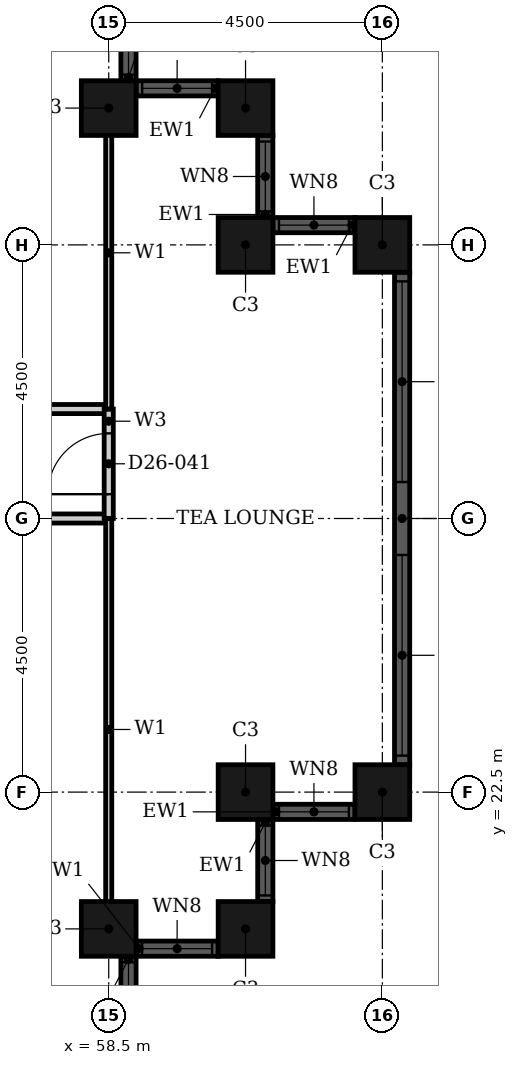
"""IFC4 building model, lengths in metres.
Left out: names, types, materials, properties, quantities, classifications, styles, units other than length and angle.
Written with IfcOpenShell. Run it as: python <this file> out.ifc"""

import sys

from ifc_helpers import new_model, si_unit, direction, frame, frame_2d, origin, origin_2d, place, context, subcontext, project, spatial, rectangle, hollow_rectangle, extrude, element, fill, save


model = new_model("IFC4")
c1 = context("Model", 3, precision=1e-05, world=origin(), true_north=direction((0.0, 1.0)))
c2 = subcontext(c1, "Body", "Model", "MODEL_VIEW")
j1 = project(units=[si_unit("LENGTHUNIT", "METRE"), si_unit("PLANEANGLEUNIT", "RADIAN")], contexts=[c1])
p1 = place(None, origin())
s1 = spatial("IfcSite", under=j1, at=p1, CompositionType="ELEMENT")
p2 = place(p1, origin())
s2 = spatial("IfcBuilding", under=s1, at=p2, CompositionType="ELEMENT")
p3 = place(p2, frame((0.0, 0.0, 108.0)))
s3 = spatial("IfcBuildingStorey", under=s2, at=p3, CompositionType="ELEMENT", Elevation=108.0)
for number, where, z_axis, x_axis in (
    (1, (58.5, 20.25, 0.0), (0.0, 0.0, 1.0), (1.0, 0.0, 0.0)),
    (2, (60.75, 20.25, 0.0), (0.0, 0.0, 1.0), (1.0, 0.0, 0.0)),
    (3, (60.75, 22.5, 0.0), (0.0, 0.0, 1.0), (1.0, 0.0, 0.0)),
    (4, (63.0, 22.5, 0.0), (0.0, 0.0, 1.0), (1.0, 0.0, 0.0)),
    (5, (63.0, 31.5, 0.0), (0.0, 0.0, 1.0), (1.0, 0.0, 0.0)),
    (6, (60.75, 31.5, 0.0), (0.0, 0.0, 1.0), (1.0, 0.0, 0.0)),
    (7, (60.75, 33.75, 0.0), (0.0, 0.0, 1.0), (1.0, 0.0, 0.0)),
    (8, (58.5, 33.75, 0.0), (0.0, 0.0, 1.0), (1.0, 0.0, 0.0)),
):
    element("IfcColumn", number, at=place(p3, frame(where, z_axis=z_axis, x_axis=x_axis)), inside=s3, PredefinedType="COLUMN", context=c2, shape_type="SweptSolid", body=[
        extrude(hollow_rectangle(XDim=0.9, YDim=0.9, WallThickness=0.028, at=origin_2d()), origin(), (0.0, 0.0, 1.0), 3.6),
    ])
p4 = place(p3, frame((58.825, 18.45, 0.0), z_axis=(0.0, 0.0, 1.0), x_axis=(0.0, 1.0, 0.0)))
e9 = element("IfcWall", 9, at=p4, inside=s3, PredefinedType="SOLIDWALL", context=c2, shape_type="SweptSolid", body=[
    extrude(rectangle(XDim=1.35, YDim=0.25, at=frame_2d((0.675, 0.0))), origin(), (0.0, 0.0, 1.0), 3.6),
])
p5 = place(p4, frame((0.1, 0.0, 0.9)))
e10 = element("IfcOpeningElement", 10, at=p5, cuts=e9, PredefinedType="OPENING", context=c2, shape_type="SweptSolid", body=[
    extrude(rectangle(XDim=1.15, YDim=2.08, at=frame_2d((0.575, 1.04))), frame((0.0, 0.135, 0.0), z_axis=(0.0, -1.0, 0.0), x_axis=(1.0, 0.0, 0.0)), (0.0, 0.0, 1.0), 0.27),
])
p6 = place(p3, frame((58.95, 19.925, 0.0), z_axis=(0.0, 0.0, 1.0), x_axis=(1.0, 0.0, 0.0)))
e11 = element("IfcWall", 11, at=p6, inside=s3, PredefinedType="SOLIDWALL", context=c2, shape_type="SweptSolid", body=[
    extrude(rectangle(XDim=1.35, YDim=0.25, at=frame_2d((0.675, 0.0))), origin(), (0.0, 0.0, 1.0), 3.6),
])
p7 = place(p6, frame((0.1, 0.0, 0.9)))
e12 = element("IfcOpeningElement", 12, at=p7, cuts=e11, PredefinedType="OPENING", context=c2, shape_type="SweptSolid", body=[
    extrude(rectangle(XDim=1.15, YDim=2.08, at=frame_2d((0.575, 1.04))), frame((0.0, 0.135, 0.0), z_axis=(0.0, -1.0, 0.0), x_axis=(1.0, 0.0, 0.0)), (0.0, 0.0, 1.0), 0.27),
])
p8 = place(p3, frame((61.075, 20.7, 0.0), z_axis=(0.0, 0.0, 1.0), x_axis=(0.0, 1.0, 0.0)))
e13 = element("IfcWall", 13, at=p8, inside=s3, PredefinedType="SOLIDWALL", context=c2, shape_type="SweptSolid", body=[
    extrude(rectangle(XDim=1.35, YDim=0.25, at=frame_2d((0.675, 0.0))), origin(), (0.0, 0.0, 1.0), 3.6),
])
p9 = place(p8, frame((0.1, 0.0, 0.9)))
e14 = element("IfcOpeningElement", 14, at=p9, cuts=e13, PredefinedType="OPENING", context=c2, shape_type="SweptSolid", body=[
    extrude(rectangle(XDim=1.15, YDim=2.08, at=frame_2d((0.575, 1.04))), frame((0.0, 0.135, 0.0), z_axis=(0.0, -1.0, 0.0), x_axis=(1.0, 0.0, 0.0)), (0.0, 0.0, 1.0), 0.27),
])
p10 = place(p3, frame((61.2, 22.175, 0.0), z_axis=(0.0, 0.0, 1.0), x_axis=(1.0, 0.0, 0.0)))
e15 = element("IfcWall", 15, at=p10, inside=s3, PredefinedType="SOLIDWALL", context=c2, shape_type="SweptSolid", body=[
    extrude(rectangle(XDim=1.35, YDim=0.25, at=frame_2d((0.675, 0.0))), origin(), (0.0, 0.0, 1.0), 3.6),
])
p11 = place(p10, frame((0.1, 0.0, 0.9)))
e16 = element("IfcOpeningElement", 16, at=p11, cuts=e15, PredefinedType="OPENING", context=c2, shape_type="SweptSolid", body=[
    extrude(rectangle(XDim=1.15, YDim=2.08, at=frame_2d((0.575, 1.04))), frame((0.0, 0.135, 0.0), z_axis=(0.0, -1.0, 0.0), x_axis=(1.0, 0.0, 0.0)), (0.0, 0.0, 1.0), 0.27),
])
p12 = place(p3, frame((63.325, 22.95, 0.0), z_axis=(0.0, 0.0, 1.0), x_axis=(0.0, 1.0, 0.0)))
e17 = element("IfcWall", 17, at=p12, inside=s3, PredefinedType="SOLIDWALL", context=c2, shape_type="SweptSolid", body=[
    extrude(rectangle(XDim=8.1, YDim=0.25, at=frame_2d((4.05, 0.0))), origin(), (0.0, 0.0, 1.0), 3.6),
])
p13 = place(p12, frame((0.15, 0.0, 0.9)))
e18 = element("IfcOpeningElement", 18, at=p13, cuts=e17, PredefinedType="OPENING", context=c2, shape_type="SweptSolid", body=[
    extrude(rectangle(XDim=3.3, YDim=2.08, at=frame_2d((1.65, 1.04))), frame((0.0, 0.135, 0.0), z_axis=(0.0, -1.0, 0.0), x_axis=(1.0, 0.0, 0.0)), (0.0, 0.0, 1.0), 0.27),
])
p14 = place(p12, frame((4.65, 0.0, 0.9)))
e19 = element("IfcOpeningElement", 19, at=p14, cuts=e17, PredefinedType="OPENING", context=c2, shape_type="SweptSolid", body=[
    extrude(rectangle(XDim=3.3, YDim=2.08, at=frame_2d((1.65, 1.04))), frame((0.0, 0.135, 0.0), z_axis=(0.0, -1.0, 0.0), x_axis=(1.0, 0.0, 0.0)), (0.0, 0.0, 1.0), 0.27),
])
p15 = place(p3, frame((62.55, 31.825, 0.0), z_axis=(0.0, 0.0, 1.0), x_axis=(-1.0, 0.0, 0.0)))
e20 = element("IfcWall", 20, at=p15, inside=s3, PredefinedType="SOLIDWALL", context=c2, shape_type="SweptSolid", body=[
    extrude(rectangle(XDim=1.35, YDim=0.25, at=frame_2d((0.675, 0.0))), origin(), (0.0, 0.0, 1.0), 3.6),
])
p16 = place(p15, frame((0.1, 0.0, 0.9)))
e21 = element("IfcOpeningElement", 21, at=p16, cuts=e20, PredefinedType="OPENING", context=c2, shape_type="SweptSolid", body=[
    extrude(rectangle(XDim=1.15, YDim=2.08, at=frame_2d((0.575, 1.04))), frame((0.0, 0.135, 0.0), z_axis=(0.0, -1.0, 0.0), x_axis=(1.0, 0.0, 0.0)), (0.0, 0.0, 1.0), 0.27),
])
p17 = place(p3, frame((61.075, 31.95, 0.0), z_axis=(0.0, 0.0, 1.0), x_axis=(0.0, 1.0, 0.0)))
e22 = element("IfcWall", 22, at=p17, inside=s3, PredefinedType="SOLIDWALL", context=c2, shape_type="SweptSolid", body=[
    extrude(rectangle(XDim=1.35, YDim=0.25, at=frame_2d((0.675, 0.0))), origin(), (0.0, 0.0, 1.0), 3.6),
])
p18 = place(p17, frame((0.1, 0.0, 0.9)))
e23 = element("IfcOpeningElement", 23, at=p18, cuts=e22, PredefinedType="OPENING", context=c2, shape_type="SweptSolid", body=[
    extrude(rectangle(XDim=1.15, YDim=2.08, at=frame_2d((0.575, 1.04))), frame((0.0, 0.135, 0.0), z_axis=(0.0, -1.0, 0.0), x_axis=(1.0, 0.0, 0.0)), (0.0, 0.0, 1.0), 0.27),
])
p19 = place(p3, frame((60.3, 34.075, 0.0), z_axis=(0.0, 0.0, 1.0), x_axis=(-1.0, 0.0, 0.0)))
e24 = element("IfcWall", 24, at=p19, inside=s3, PredefinedType="SOLIDWALL", context=c2, shape_type="SweptSolid", body=[
    extrude(rectangle(XDim=1.35, YDim=0.25, at=frame_2d((0.675, 0.0))), origin(), (0.0, 0.0, 1.0), 3.6),
])
p20 = place(p19, frame((0.1, 0.0, 0.9)))
e25 = element("IfcOpeningElement", 25, at=p20, cuts=e24, PredefinedType="OPENING", context=c2, shape_type="SweptSolid", body=[
    extrude(rectangle(XDim=1.15, YDim=2.08, at=frame_2d((0.575, 1.04))), frame((0.0, 0.135, 0.0), z_axis=(0.0, -1.0, 0.0), x_axis=(1.0, 0.0, 0.0)), (0.0, 0.0, 1.0), 0.27),
])
p21 = place(p3, frame((58.825, 34.2, 0.0), z_axis=(0.0, 0.0, 1.0), x_axis=(0.0, 1.0, 0.0)))
e26 = element("IfcWall", 26, at=p21, inside=s3, PredefinedType="SOLIDWALL", context=c2, shape_type="SweptSolid", body=[
    extrude(rectangle(XDim=1.35, YDim=0.25, at=frame_2d((0.675, 0.0))), origin(), (0.0, 0.0, 1.0), 3.6),
])
p22 = place(p21, frame((0.1, 0.0, 0.9)))
e27 = element("IfcOpeningElement", 27, at=p22, cuts=e26, PredefinedType="OPENING", context=c2, shape_type="SweptSolid", body=[
    extrude(rectangle(XDim=1.15, YDim=2.08, at=frame_2d((0.575, 1.04))), frame((0.0, 0.135, 0.0), z_axis=(0.0, -1.0, 0.0), x_axis=(1.0, 0.0, 0.0)), (0.0, 0.0, 1.0), 0.27),
])
p23 = place(p3, frame((46.8, 27.0, 0.0), z_axis=(0.0, 0.0, 1.0), x_axis=(1.0, 0.0, 0.0)))
e28 = element("IfcWall", 28, at=p23, inside=s3, PredefinedType="PARTITIONING", context=c2, shape_type="SweptSolid", body=[
    extrude(rectangle(XDim=11.7, YDim=0.15, at=frame_2d((5.85, 0.0))), origin(), (0.0, 0.0, 1.0), 2.58),
])
p24 = place(p23, frame((4.45, 0.0, 0.0)))
e29 = element("IfcOpeningElement", 29, at=p24, cuts=e28, PredefinedType="OPENING", context=c2, shape_type="SweptSolid", body=[
    extrude(rectangle(XDim=1.0, YDim=2.1, at=frame_2d((0.5, 1.05))), frame((0.0, 0.085, 0.0), z_axis=(0.0, -1.0, 0.0), x_axis=(1.0, 0.0, 0.0)), (0.0, 0.0, 1.0), 0.17),
])
p25 = place(p3, frame((46.8, 28.8, 0.0), z_axis=(0.0, 0.0, 1.0), x_axis=(1.0, 0.0, 0.0)))
e30 = element("IfcWall", 30, at=p25, inside=s3, PredefinedType="PARTITIONING", context=c2, shape_type="SweptSolid", body=[
    extrude(rectangle(XDim=11.7, YDim=0.15, at=frame_2d((5.85, 0.0))), origin(), (0.0, 0.0, 1.0), 3.3),
])
p26 = place(p25, frame((4.45, 0.0, 0.0)))
e31 = element("IfcOpeningElement", 31, at=p26, cuts=e30, PredefinedType="OPENING", context=c2, shape_type="SweptSolid", body=[
    extrude(rectangle(XDim=1.0, YDim=2.1, at=frame_2d((0.5, 1.05))), frame((0.0, 0.085, 0.0), z_axis=(0.0, -1.0, 0.0), x_axis=(1.0, 0.0, 0.0)), (0.0, 0.0, 1.0), 0.17),
])
p27 = place(p3, frame((58.5, 27.0, 0.0), z_axis=(0.0, 0.0, 1.0), x_axis=(0.0, 1.0, 0.0)))
e32 = element("IfcWall", 32, at=p27, inside=s3, PredefinedType="PARTITIONING", context=c2, shape_type="SweptSolid", body=[
    extrude(rectangle(XDim=1.8, YDim=0.15, at=frame_2d((0.9, 0.0))), origin(), (0.0, 0.0, 1.0), 3.3),
])
p28 = place(p27, frame((0.4, 0.0, 0.0)))
e33 = element("IfcOpeningElement", 33, at=p28, cuts=e32, PredefinedType="OPENING", context=c2, shape_type="SweptSolid", body=[
    extrude(rectangle(XDim=1.0, YDim=2.1, at=frame_2d((0.5, 1.05))), frame((0.0, 0.085, 0.0), z_axis=(0.0, -1.0, 0.0), x_axis=(1.0, 0.0, 0.0)), (0.0, 0.0, 1.0), 0.17),
])
p29 = place(p3, frame((58.5, 28.8, 0.0), z_axis=(0.0, 0.0, 1.0), x_axis=(0.0, 1.0, 0.0)))
e34 = element("IfcWall", 34, at=p29, inside=s3, PredefinedType="PARTITIONING", context=c2, shape_type="SweptSolid", body=[
    extrude(rectangle(XDim=5.14, YDim=0.1, at=frame_2d((2.57, 0.0))), origin(), (0.0, 0.0, 1.0), 3.3),
])
p30 = place(p3, frame((58.5, 20.06, 0.0), z_axis=(0.0, 0.0, 1.0), x_axis=(0.0, 1.0, 0.0)))
e35 = element("IfcWall", 35, at=p30, inside=s3, PredefinedType="PARTITIONING", context=c2, shape_type="SweptSolid", body=[
    extrude(rectangle(XDim=6.94, YDim=0.1, at=frame_2d((3.47, 0.0))), origin(), (0.0, 0.0, 1.0), 3.3),
])
p31 = place(p5, origin())
e36 = element("IfcWindow", 36, at=p31, inside=s3, PartitioningType="SINGLE_PANEL", PredefinedType="WINDOW", context=c2, shape_type="SweptSolid", body=[
    extrude(rectangle(XDim=1.15, YDim=2.08, at=frame_2d((0.575, 1.04))), frame((0.0, 0.03, 0.0), z_axis=(0.0, -1.0, 0.0), x_axis=(1.0, 0.0, 0.0)), (0.0, 0.0, 1.0), 0.06),
])
fill(e10, e36)
p32 = place(p7, origin())
e37 = element("IfcWindow", 37, at=p32, inside=s3, PartitioningType="SINGLE_PANEL", PredefinedType="WINDOW", context=c2, shape_type="SweptSolid", body=[
    extrude(rectangle(XDim=1.15, YDim=2.08, at=frame_2d((0.575, 1.04))), frame((0.0, 0.03, 0.0), z_axis=(0.0, -1.0, 0.0), x_axis=(1.0, 0.0, 0.0)), (0.0, 0.0, 1.0), 0.06),
])
fill(e12, e37)
p33 = place(p9, origin())
e38 = element("IfcWindow", 38, at=p33, inside=s3, PartitioningType="SINGLE_PANEL", PredefinedType="WINDOW", context=c2, shape_type="SweptSolid", body=[
    extrude(rectangle(XDim=1.15, YDim=2.08, at=frame_2d((0.575, 1.04))), frame((0.0, 0.03, 0.0), z_axis=(0.0, -1.0, 0.0), x_axis=(1.0, 0.0, 0.0)), (0.0, 0.0, 1.0), 0.06),
])
fill(e14, e38)
p34 = place(p11, origin())
e39 = element("IfcWindow", 39, at=p34, inside=s3, PartitioningType="SINGLE_PANEL", PredefinedType="WINDOW", context=c2, shape_type="SweptSolid", body=[
    extrude(rectangle(XDim=1.15, YDim=2.08, at=frame_2d((0.575, 1.04))), frame((0.0, 0.03, 0.0), z_axis=(0.0, -1.0, 0.0), x_axis=(1.0, 0.0, 0.0)), (0.0, 0.0, 1.0), 0.06),
])
fill(e16, e39)
p35 = place(p13, origin())
e40 = element("IfcWindow", 40, at=p35, inside=s3, PartitioningType="SINGLE_PANEL", PredefinedType="WINDOW", context=c2, shape_type="SweptSolid", body=[
    extrude(rectangle(XDim=3.3, YDim=2.08, at=frame_2d((1.65, 1.04))), frame((0.0, 0.03, 0.0), z_axis=(0.0, -1.0, 0.0), x_axis=(1.0, 0.0, 0.0)), (0.0, 0.0, 1.0), 0.06),
])
fill(e18, e40)
p36 = place(p14, origin())
e41 = element("IfcWindow", 41, at=p36, inside=s3, PartitioningType="SINGLE_PANEL", PredefinedType="WINDOW", context=c2, shape_type="SweptSolid", body=[
    extrude(rectangle(XDim=3.3, YDim=2.08, at=frame_2d((1.65, 1.04))), frame((0.0, 0.03, 0.0), z_axis=(0.0, -1.0, 0.0), x_axis=(1.0, 0.0, 0.0)), (0.0, 0.0, 1.0), 0.06),
])
fill(e19, e41)
p37 = place(p16, origin())
e42 = element("IfcWindow", 42, at=p37, inside=s3, PartitioningType="SINGLE_PANEL", PredefinedType="WINDOW", context=c2, shape_type="SweptSolid", body=[
    extrude(rectangle(XDim=1.15, YDim=2.08, at=frame_2d((0.575, 1.04))), frame((0.0, 0.03, 0.0), z_axis=(0.0, -1.0, 0.0), x_axis=(1.0, 0.0, 0.0)), (0.0, 0.0, 1.0), 0.06),
])
fill(e21, e42)
p38 = place(p18, origin())
e43 = element("IfcWindow", 43, at=p38, inside=s3, PartitioningType="SINGLE_PANEL", PredefinedType="WINDOW", context=c2, shape_type="SweptSolid", body=[
    extrude(rectangle(XDim=1.15, YDim=2.08, at=frame_2d((0.575, 1.04))), frame((0.0, 0.03, 0.0), z_axis=(0.0, -1.0, 0.0), x_axis=(1.0, 0.0, 0.0)), (0.0, 0.0, 1.0), 0.06),
])
fill(e23, e43)
p39 = place(p20, origin())
e44 = element("IfcWindow", 44, at=p39, inside=s3, PartitioningType="SINGLE_PANEL", PredefinedType="WINDOW", context=c2, shape_type="SweptSolid", body=[
    extrude(rectangle(XDim=1.15, YDim=2.08, at=frame_2d((0.575, 1.04))), frame((0.0, 0.03, 0.0), z_axis=(0.0, -1.0, 0.0), x_axis=(1.0, 0.0, 0.0)), (0.0, 0.0, 1.0), 0.06),
])
fill(e25, e44)
p40 = place(p22, origin())
e45 = element("IfcWindow", 45, at=p40, inside=s3, PartitioningType="SINGLE_PANEL", PredefinedType="WINDOW", context=c2, shape_type="SweptSolid", body=[
    extrude(rectangle(XDim=1.15, YDim=2.08, at=frame_2d((0.575, 1.04))), frame((0.0, 0.03, 0.0), z_axis=(0.0, -1.0, 0.0), x_axis=(1.0, 0.0, 0.0)), (0.0, 0.0, 1.0), 0.06),
])
fill(e27, e45)
p41 = place(p28, origin())
e46 = element("IfcDoor", 46, at=p41, inside=s3, OperationType="SINGLE_SWING_LEFT", PredefinedType="DOOR", context=c2, shape_type="SweptSolid", body=[
    extrude(rectangle(XDim=1.0, YDim=2.1, at=frame_2d((0.5, 1.05))), frame((0.0, 0.025, 0.0), z_axis=(0.0, -1.0, 0.0), x_axis=(1.0, 0.0, 0.0)), (0.0, 0.0, 1.0), 0.05),
])
fill(e33, e46)
save(model, sys.argv[1])
